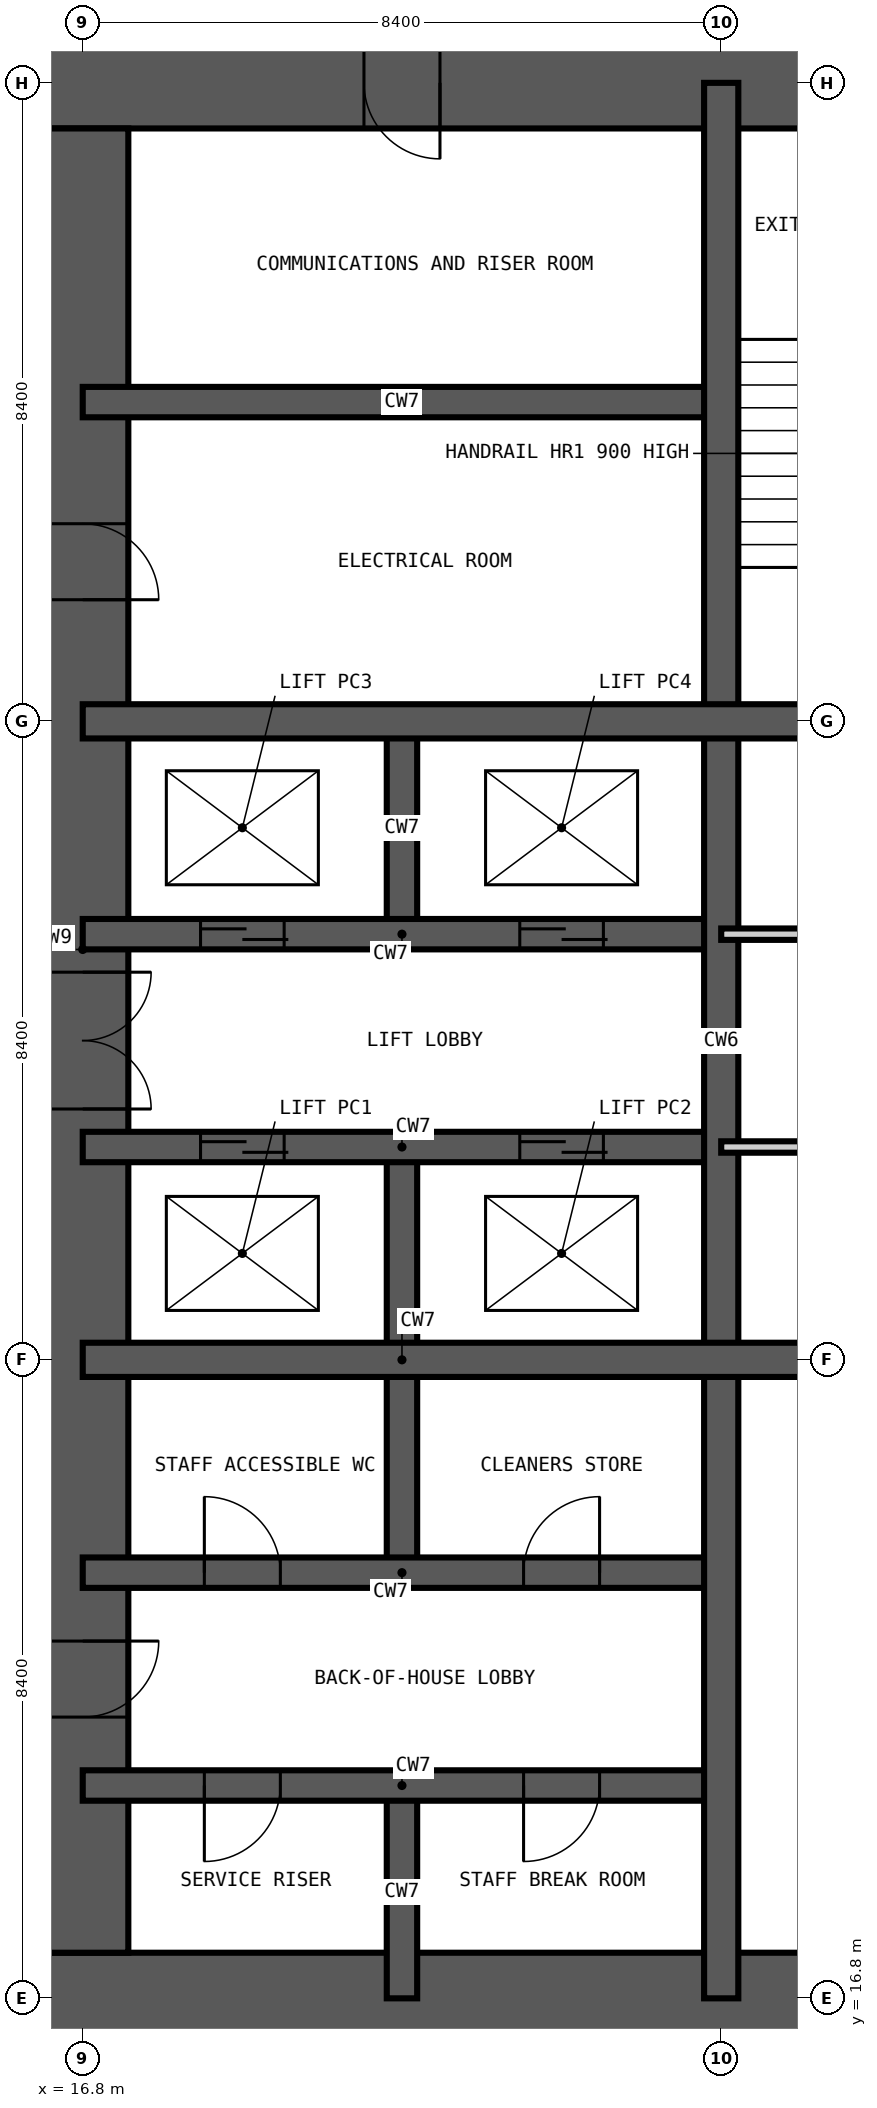
"""IFC4 building model, lengths in metres.
Left out: names, types, materials, properties, quantities, classifications, styles, units other than length and angle.
Written with IfcOpenShell. Run it as: python <this file> out.ifc"""

import sys

from ifc_helpers import new_model, si_unit, direction, frame, frame_2d, origin, place, context, subcontext, project, spatial, rectangle, extrude, element, fill, save


model = new_model("IFC4")
c1 = context("Model", 3, precision=1e-05, world=origin(), true_north=direction((0.0, 1.0)))
c2 = subcontext(c1, "Body", "Model", "MODEL_VIEW")
j1 = project(units=[si_unit("LENGTHUNIT", "METRE"), si_unit("PLANEANGLEUNIT", "RADIAN")], contexts=[c1])
p1 = place(None, origin())
s1 = spatial("IfcSite", under=j1, at=p1, CompositionType="ELEMENT")
p2 = place(p1, origin())
s2 = spatial("IfcBuilding", under=s1, at=p2, CompositionType="ELEMENT")
p3 = place(p2, frame((0.0, 0.0, 162.6)))
s3 = spatial("IfcBuildingStorey", under=s2, at=p3, CompositionType="ELEMENT", Elevation=162.6)
p4 = place(p3, frame((16.2, 16.8, -0.35), z_axis=(0.0, 0.0, 1.0), x_axis=(1.0, 0.0, 0.0)))
e1 = element("IfcWall", 1, at=p4, inside=s3, PredefinedType="SHEAR", context=c2, shape_type="SweptSolid", body=[
    extrude(rectangle(XDim=26.4, YDim=1.2, at=frame_2d((13.2, 0.0))), origin(), (0.0, 0.0, 1.0), 3.6),
])
p5 = place(p4, frame((12.7, 0.0, 0.35)))
e2 = element("IfcOpeningElement", 2, at=p5, cuts=e1, PredefinedType="OPENING", context=c2, shape_type="SweptSolid", body=[
    extrude(rectangle(XDim=1.0, YDim=2.1, at=frame_2d((0.5, 1.05))), frame((0.0, 0.61, 0.0), z_axis=(0.0, -1.0, 0.0), x_axis=(1.0, 0.0, 0.0)), (0.0, 0.0, 1.0), 1.22),
])
p6 = place(p4, frame((19.0, 0.0, 0.35)))
e3 = element("IfcOpeningElement", 3, at=p6, cuts=e1, PredefinedType="OPENING", context=c2, shape_type="SweptSolid", body=[
    extrude(rectangle(XDim=1.0, YDim=2.1, at=frame_2d((0.5, 1.05))), frame((0.0, 0.61, 0.0), z_axis=(0.0, -1.0, 0.0), x_axis=(1.0, 0.0, 0.0)), (0.0, 0.0, 1.0), 1.22),
])
p7 = place(p3, frame((42.6, 42.0, -0.35), z_axis=(0.0, 0.0, 1.0), x_axis=(-1.0, 0.0, 0.0)))
e4 = element("IfcWall", 4, at=p7, inside=s3, PredefinedType="SHEAR", context=c2, shape_type="SweptSolid", body=[
    extrude(rectangle(XDim=26.4, YDim=1.2, at=frame_2d((13.2, 0.0))), origin(), (0.0, 0.0, 1.0), 3.6),
])
p8 = place(p7, frame((21.1, 0.0, 0.35)))
e5 = element("IfcOpeningElement", 5, at=p8, cuts=e4, PredefinedType="OPENING", context=c2, shape_type="SweptSolid", body=[
    extrude(rectangle(XDim=1.0, YDim=2.1, at=frame_2d((0.5, 1.05))), frame((0.0, 0.61, 0.0), z_axis=(0.0, -1.0, 0.0), x_axis=(1.0, 0.0, 0.0)), (0.0, 0.0, 1.0), 1.22),
])
p9 = place(p7, frame((10.5, 0.0, 0.35)))
e6 = element("IfcOpeningElement", 6, at=p9, cuts=e4, PredefinedType="OPENING", context=c2, shape_type="SweptSolid", body=[
    extrude(rectangle(XDim=1.2, YDim=2.2, at=frame_2d((0.6, 1.1))), frame((0.0, 0.61, 0.0), z_axis=(0.0, -1.0, 0.0), x_axis=(1.0, 0.0, 0.0)), (0.0, 0.0, 1.0), 1.22),
])
p10 = place(p3, frame((16.8, 41.4, -0.35), z_axis=(0.0, 0.0, 1.0), x_axis=(0.0, -1.0, 0.0)))
e7 = element("IfcWall", 7, at=p10, inside=s3, PredefinedType="SHEAR", context=c2, shape_type="SweptSolid", body=[
    extrude(rectangle(XDim=24.0, YDim=1.2, at=frame_2d((12.0, 0.0))), origin(), (0.0, 0.0, 1.0), 3.6),
])
p11 = place(p10, frame((11.1, 0.0, 0.35)))
e8 = element("IfcOpeningElement", 8, at=p11, cuts=e7, PredefinedType="OPENING", context=c2, shape_type="SweptSolid", body=[
    extrude(rectangle(XDim=1.8, YDim=2.2, at=frame_2d((0.9, 1.1))), frame((0.0, 0.61, 0.0), z_axis=(0.0, -1.0, 0.0), x_axis=(1.0, 0.0, 0.0)), (0.0, 0.0, 1.0), 1.22),
])
p12 = place(p10, frame((19.9, 0.0, 0.35)))
e9 = element("IfcOpeningElement", 9, at=p12, cuts=e7, PredefinedType="OPENING", context=c2, shape_type="SweptSolid", body=[
    extrude(rectangle(XDim=1.0, YDim=2.1, at=frame_2d((0.5, 1.05))), frame((0.0, 0.61, 0.0), z_axis=(0.0, -1.0, 0.0), x_axis=(1.0, 0.0, 0.0)), (0.0, 0.0, 1.0), 1.22),
])
p13 = place(p10, frame((5.2, 0.0, 0.35)))
e10 = element("IfcOpeningElement", 10, at=p13, cuts=e7, PredefinedType="OPENING", context=c2, shape_type="SweptSolid", body=[
    extrude(rectangle(XDim=1.0, YDim=2.1, at=frame_2d((0.5, 1.05))), frame((0.0, 0.61, 0.0), z_axis=(0.0, -1.0, 0.0), x_axis=(1.0, 0.0, 0.0)), (0.0, 0.0, 1.0), 1.22),
])
p14 = place(p3, frame((21.0, 16.8, -0.35), z_axis=(0.0, 0.0, 1.0), x_axis=(0.0, 1.0, 0.0)))
e11 = element("IfcWall", 11, at=p14, inside=s3, PredefinedType="SHEAR", context=c2, shape_type="SweptSolid", body=[
    extrude(rectangle(XDim=2.8, YDim=0.4, at=frame_2d((1.4, 0.0))), origin(), (0.0, 0.0, 1.0), 3.6),
])
p15 = place(p3, frame((21.0, 22.4, -0.35), z_axis=(0.0, 0.0, 1.0), x_axis=(0.0, 1.0, 0.0)))
e12 = element("IfcWall", 12, at=p15, inside=s3, PredefinedType="SHEAR", context=c2, shape_type="SweptSolid", body=[
    extrude(rectangle(XDim=5.6, YDim=0.4, at=frame_2d((2.8, 0.0))), origin(), (0.0, 0.0, 1.0), 3.6),
])
p16 = place(p3, frame((21.0, 30.8, -0.35), z_axis=(0.0, 0.0, 1.0), x_axis=(0.0, 1.0, 0.0)))
e13 = element("IfcWall", 13, at=p16, inside=s3, PredefinedType="SHEAR", context=c2, shape_type="SweptSolid", body=[
    extrude(rectangle(XDim=2.8, YDim=0.4, at=frame_2d((1.4, 0.0))), origin(), (0.0, 0.0, 1.0), 3.6),
])
p17 = place(p3, frame((16.8, 19.6, -0.35), z_axis=(0.0, 0.0, 1.0), x_axis=(1.0, 0.0, 0.0)))
e14 = element("IfcWall", 14, at=p17, inside=s3, PredefinedType="SHEAR", context=c2, shape_type="SweptSolid", body=[
    extrude(rectangle(XDim=8.4, YDim=0.4, at=frame_2d((4.2, 0.0))), origin(), (0.0, 0.0, 1.0), 3.6),
])
p18 = place(p17, frame((1.6, 0.0, 0.35)))
e15 = element("IfcOpeningElement", 15, at=p18, cuts=e14, PredefinedType="OPENING", context=c2, shape_type="SweptSolid", body=[
    extrude(rectangle(XDim=1.0, YDim=2.1, at=frame_2d((0.5, 1.05))), frame((0.0, 0.21, 0.0), z_axis=(0.0, -1.0, 0.0), x_axis=(1.0, 0.0, 0.0)), (0.0, 0.0, 1.0), 0.42),
])
p19 = place(p17, frame((5.8, 0.0, 0.35)))
e16 = element("IfcOpeningElement", 16, at=p19, cuts=e14, PredefinedType="OPENING", context=c2, shape_type="SweptSolid", body=[
    extrude(rectangle(XDim=1.0, YDim=2.1, at=frame_2d((0.5, 1.05))), frame((0.0, 0.21, 0.0), z_axis=(0.0, -1.0, 0.0), x_axis=(1.0, 0.0, 0.0)), (0.0, 0.0, 1.0), 0.42),
])
p20 = place(p3, frame((16.8, 22.4, -0.35), z_axis=(0.0, 0.0, 1.0), x_axis=(1.0, 0.0, 0.0)))
e17 = element("IfcWall", 17, at=p20, inside=s3, PredefinedType="SHEAR", context=c2, shape_type="SweptSolid", body=[
    extrude(rectangle(XDim=8.4, YDim=0.4, at=frame_2d((4.2, 0.0))), origin(), (0.0, 0.0, 1.0), 3.6),
])
p21 = place(p20, frame((1.6, 0.0, 0.35)))
e18 = element("IfcOpeningElement", 18, at=p21, cuts=e17, PredefinedType="OPENING", context=c2, shape_type="SweptSolid", body=[
    extrude(rectangle(XDim=1.0, YDim=2.1, at=frame_2d((0.5, 1.05))), frame((0.0, 0.21, 0.0), z_axis=(0.0, -1.0, 0.0), x_axis=(1.0, 0.0, 0.0)), (0.0, 0.0, 1.0), 0.42),
])
p22 = place(p20, frame((5.8, 0.0, 0.35)))
e19 = element("IfcOpeningElement", 19, at=p22, cuts=e17, PredefinedType="OPENING", context=c2, shape_type="SweptSolid", body=[
    extrude(rectangle(XDim=1.0, YDim=2.1, at=frame_2d((0.5, 1.05))), frame((0.0, 0.21, 0.0), z_axis=(0.0, -1.0, 0.0), x_axis=(1.0, 0.0, 0.0)), (0.0, 0.0, 1.0), 0.42),
])
p23 = place(p3, frame((16.8, 28.0, -0.35), z_axis=(0.0, 0.0, 1.0), x_axis=(1.0, 0.0, 0.0)))
e20 = element("IfcWall", 20, at=p23, inside=s3, PredefinedType="SHEAR", context=c2, shape_type="SweptSolid", body=[
    extrude(rectangle(XDim=8.4, YDim=0.4, at=frame_2d((4.2, 0.0))), origin(), (0.0, 0.0, 1.0), 3.6),
])
p24 = place(p23, frame((1.55, 0.0, 0.35)))
e21 = element("IfcOpeningElement", 21, at=p24, cuts=e20, PredefinedType="OPENING", context=c2, shape_type="SweptSolid", body=[
    extrude(rectangle(XDim=1.1, YDim=2.2, at=frame_2d((0.55, 1.1))), frame((0.0, 0.21, 0.0), z_axis=(0.0, -1.0, 0.0), x_axis=(1.0, 0.0, 0.0)), (0.0, 0.0, 1.0), 0.42),
])
p25 = place(p23, frame((5.75, 0.0, 0.35)))
e22 = element("IfcOpeningElement", 22, at=p25, cuts=e20, PredefinedType="OPENING", context=c2, shape_type="SweptSolid", body=[
    extrude(rectangle(XDim=1.1, YDim=2.2, at=frame_2d((0.55, 1.1))), frame((0.0, 0.21, 0.0), z_axis=(0.0, -1.0, 0.0), x_axis=(1.0, 0.0, 0.0)), (0.0, 0.0, 1.0), 0.42),
])
p26 = place(p3, frame((16.8, 30.8, -0.35), z_axis=(0.0, 0.0, 1.0), x_axis=(1.0, 0.0, 0.0)))
e23 = element("IfcWall", 23, at=p26, inside=s3, PredefinedType="SHEAR", context=c2, shape_type="SweptSolid", body=[
    extrude(rectangle(XDim=8.4, YDim=0.4, at=frame_2d((4.2, 0.0))), origin(), (0.0, 0.0, 1.0), 3.6),
])
p27 = place(p26, frame((1.55, 0.0, 0.35)))
e24 = element("IfcOpeningElement", 24, at=p27, cuts=e23, PredefinedType="OPENING", context=c2, shape_type="SweptSolid", body=[
    extrude(rectangle(XDim=1.1, YDim=2.2, at=frame_2d((0.55, 1.1))), frame((0.0, 0.21, 0.0), z_axis=(0.0, -1.0, 0.0), x_axis=(1.0, 0.0, 0.0)), (0.0, 0.0, 1.0), 0.42),
])
p28 = place(p26, frame((5.75, 0.0, 0.35)))
e25 = element("IfcOpeningElement", 25, at=p28, cuts=e23, PredefinedType="OPENING", context=c2, shape_type="SweptSolid", body=[
    extrude(rectangle(XDim=1.1, YDim=2.2, at=frame_2d((0.55, 1.1))), frame((0.0, 0.21, 0.0), z_axis=(0.0, -1.0, 0.0), x_axis=(1.0, 0.0, 0.0)), (0.0, 0.0, 1.0), 0.42),
])
p29 = place(p3, frame((16.8, 37.8, -0.35), z_axis=(0.0, 0.0, 1.0), x_axis=(1.0, 0.0, 0.0)))
e26 = element("IfcWall", 26, at=p29, inside=s3, PredefinedType="SHEAR", context=c2, shape_type="SweptSolid", body=[
    extrude(rectangle(XDim=8.4, YDim=0.4, at=frame_2d((4.2, 0.0))), origin(), (0.0, 0.0, 1.0), 3.6),
])
for number, where, z_axis, x_axis in (
    (27, (25.2, 16.8, -0.35), (0.0, 0.0, 1.0), (0.0, 1.0, 0.0)),
    (28, (16.8, 25.2, -0.35), (0.0, 0.0, 1.0), (1.0, 0.0, 0.0)),
    (29, (16.8, 33.6, -0.35), (0.0, 0.0, 1.0), (1.0, 0.0, 0.0)),
):
    element("IfcWall", number, at=place(p3, frame(where, z_axis=z_axis, x_axis=x_axis)), inside=s3, PredefinedType="SHEAR", context=c2, shape_type="SweptSolid", body=[
        extrude(rectangle(XDim=25.2, YDim=0.45, at=frame_2d((12.6, 0.0))), origin(), (0.0, 0.0, 1.0), 3.6),
    ])
p30 = place(p3, frame((25.2, 28.0, 0.0), z_axis=(0.0, 0.0, 1.0), x_axis=(1.0, 0.0, 0.0)))
e30 = element("IfcWall", 30, at=p30, inside=s3, PredefinedType="PARTITIONING", context=c2, shape_type="SweptSolid", body=[
    extrude(rectangle(XDim=8.4, YDim=0.15, at=frame_2d((4.2, 0.0))), origin(), (0.0, 0.0, 1.0), 3.25),
])
p31 = place(p30, frame((3.7, 0.0, 0.0)))
e31 = element("IfcOpeningElement", 31, at=p31, cuts=e30, PredefinedType="OPENING", context=c2, shape_type="SweptSolid", body=[
    extrude(rectangle(XDim=1.0, YDim=2.1, at=frame_2d((0.5, 1.05))), frame((0.0, 0.085, 0.0), z_axis=(0.0, -1.0, 0.0), x_axis=(1.0, 0.0, 0.0)), (0.0, 0.0, 1.0), 0.17),
])
p32 = place(p3, frame((25.2, 30.8, 0.0), z_axis=(0.0, 0.0, 1.0), x_axis=(1.0, 0.0, 0.0)))
e32 = element("IfcWall", 32, at=p32, inside=s3, PredefinedType="PARTITIONING", context=c2, shape_type="SweptSolid", body=[
    extrude(rectangle(XDim=8.4, YDim=0.15, at=frame_2d((4.2, 0.0))), origin(), (0.0, 0.0, 1.0), 3.25),
])
p33 = place(p32, frame((3.7, 0.0, 0.0)))
e33 = element("IfcOpeningElement", 33, at=p33, cuts=e32, PredefinedType="OPENING", context=c2, shape_type="SweptSolid", body=[
    extrude(rectangle(XDim=1.0, YDim=2.1, at=frame_2d((0.5, 1.05))), frame((0.0, 0.085, 0.0), z_axis=(0.0, -1.0, 0.0), x_axis=(1.0, 0.0, 0.0)), (0.0, 0.0, 1.0), 0.17),
])
p34 = place(p24, origin())
e34 = element("IfcDoor", 34, at=p34, inside=s3, OperationType="DOUBLE_DOOR_SLIDING", PredefinedType="DOOR", context=c2, shape_type="SweptSolid", body=[
    extrude(rectangle(XDim=1.1, YDim=2.2, at=frame_2d((0.55, 1.1))), frame((0.0, 0.025, 0.0), z_axis=(0.0, -1.0, 0.0), x_axis=(1.0, 0.0, 0.0)), (0.0, 0.0, 1.0), 0.05),
])
fill(e21, e34)
p35 = place(p25, origin())
e35 = element("IfcDoor", 35, at=p35, inside=s3, OperationType="DOUBLE_DOOR_SLIDING", PredefinedType="DOOR", context=c2, shape_type="SweptSolid", body=[
    extrude(rectangle(XDim=1.1, YDim=2.2, at=frame_2d((0.55, 1.1))), frame((0.0, 0.025, 0.0), z_axis=(0.0, -1.0, 0.0), x_axis=(1.0, 0.0, 0.0)), (0.0, 0.0, 1.0), 0.05),
])
fill(e22, e35)
p36 = place(p27, origin())
e36 = element("IfcDoor", 36, at=p36, inside=s3, OperationType="DOUBLE_DOOR_SLIDING", PredefinedType="DOOR", context=c2, shape_type="SweptSolid", body=[
    extrude(rectangle(XDim=1.1, YDim=2.2, at=frame_2d((0.55, 1.1))), frame((0.0, 0.025, 0.0), z_axis=(0.0, -1.0, 0.0), x_axis=(1.0, 0.0, 0.0)), (0.0, 0.0, 1.0), 0.05),
])
fill(e24, e36)
p37 = place(p28, origin())
e37 = element("IfcDoor", 37, at=p37, inside=s3, OperationType="DOUBLE_DOOR_SLIDING", PredefinedType="DOOR", context=c2, shape_type="SweptSolid", body=[
    extrude(rectangle(XDim=1.1, YDim=2.2, at=frame_2d((0.55, 1.1))), frame((0.0, 0.025, 0.0), z_axis=(0.0, -1.0, 0.0), x_axis=(1.0, 0.0, 0.0)), (0.0, 0.0, 1.0), 0.05),
])
fill(e25, e37)
p38 = place(p11, origin())
e38 = element("IfcDoor", 38, at=p38, inside=s3, OperationType="DOUBLE_DOOR_DOUBLE_SWING", PredefinedType="DOOR", context=c2, shape_type="SweptSolid", body=[
    extrude(rectangle(XDim=1.8, YDim=2.2, at=frame_2d((0.9, 1.1))), frame((0.0, 0.025, 0.0), z_axis=(0.0, -1.0, 0.0), x_axis=(1.0, 0.0, 0.0)), (0.0, 0.0, 1.0), 0.05),
])
fill(e8, e38)
p39 = place(p18, frame((1.0, 0.0, 0.0), z_axis=(0.0, 0.0, 1.0), x_axis=(-1.0, 0.0, 0.0)))
e39 = element("IfcDoor", 39, at=p39, inside=s3, OperationType="SINGLE_SWING_RIGHT", PredefinedType="DOOR", context=c2, shape_type="SweptSolid", body=[
    extrude(rectangle(XDim=1.0, YDim=2.1, at=frame_2d((0.5, 1.05))), frame((0.0, 0.025, 0.0), z_axis=(0.0, -1.0, 0.0), x_axis=(1.0, 0.0, 0.0)), (0.0, 0.0, 1.0), 0.05),
])
fill(e15, e39)
p40 = place(p19, frame((1.0, 0.0, 0.0), z_axis=(0.0, 0.0, 1.0), x_axis=(-1.0, 0.0, 0.0)))
e40 = element("IfcDoor", 40, at=p40, inside=s3, OperationType="SINGLE_SWING_RIGHT", PredefinedType="DOOR", context=c2, shape_type="SweptSolid", body=[
    extrude(rectangle(XDim=1.0, YDim=2.1, at=frame_2d((0.5, 1.05))), frame((0.0, 0.025, 0.0), z_axis=(0.0, -1.0, 0.0), x_axis=(1.0, 0.0, 0.0)), (0.0, 0.0, 1.0), 0.05),
])
fill(e16, e40)
p41 = place(p21, origin())
e41 = element("IfcDoor", 41, at=p41, inside=s3, OperationType="SINGLE_SWING_LEFT", PredefinedType="DOOR", context=c2, shape_type="SweptSolid", body=[
    extrude(rectangle(XDim=1.0, YDim=2.1, at=frame_2d((0.5, 1.05))), frame((0.0, 0.025, 0.0), z_axis=(0.0, -1.0, 0.0), x_axis=(1.0, 0.0, 0.0)), (0.0, 0.0, 1.0), 0.05),
])
fill(e18, e41)
p42 = place(p22, origin())
e42 = element("IfcDoor", 42, at=p42, inside=s3, OperationType="SINGLE_SWING_RIGHT", PredefinedType="DOOR", context=c2, shape_type="SweptSolid", body=[
    extrude(rectangle(XDim=1.0, YDim=2.1, at=frame_2d((0.5, 1.05))), frame((0.0, 0.025, 0.0), z_axis=(0.0, -1.0, 0.0), x_axis=(1.0, 0.0, 0.0)), (0.0, 0.0, 1.0), 0.05),
])
fill(e19, e42)
p43 = place(p12, origin())
e43 = element("IfcDoor", 43, at=p43, inside=s3, OperationType="SINGLE_SWING_LEFT", PredefinedType="DOOR", context=c2, shape_type="SweptSolid", body=[
    extrude(rectangle(XDim=1.0, YDim=2.1, at=frame_2d((0.5, 1.05))), frame((0.0, 0.025, 0.0), z_axis=(0.0, -1.0, 0.0), x_axis=(1.0, 0.0, 0.0)), (0.0, 0.0, 1.0), 0.05),
])
fill(e9, e43)
p44 = place(p13, origin())
e44 = element("IfcDoor", 44, at=p44, inside=s3, OperationType="SINGLE_SWING_RIGHT", PredefinedType="DOOR", context=c2, shape_type="SweptSolid", body=[
    extrude(rectangle(XDim=1.0, YDim=2.1, at=frame_2d((0.5, 1.05))), frame((0.0, 0.025, 0.0), z_axis=(0.0, -1.0, 0.0), x_axis=(1.0, 0.0, 0.0)), (0.0, 0.0, 1.0), 0.05),
])
fill(e10, e44)
p45 = place(p8, origin())
e45 = element("IfcDoor", 45, at=p45, inside=s3, OperationType="SINGLE_SWING_LEFT", PredefinedType="DOOR", context=c2, shape_type="SweptSolid", body=[
    extrude(rectangle(XDim=1.0, YDim=2.1, at=frame_2d((0.5, 1.05))), frame((0.0, 0.025, 0.0), z_axis=(0.0, -1.0, 0.0), x_axis=(1.0, 0.0, 0.0)), (0.0, 0.0, 1.0), 0.05),
])
fill(e5, e45)
save(model, sys.argv[1])
